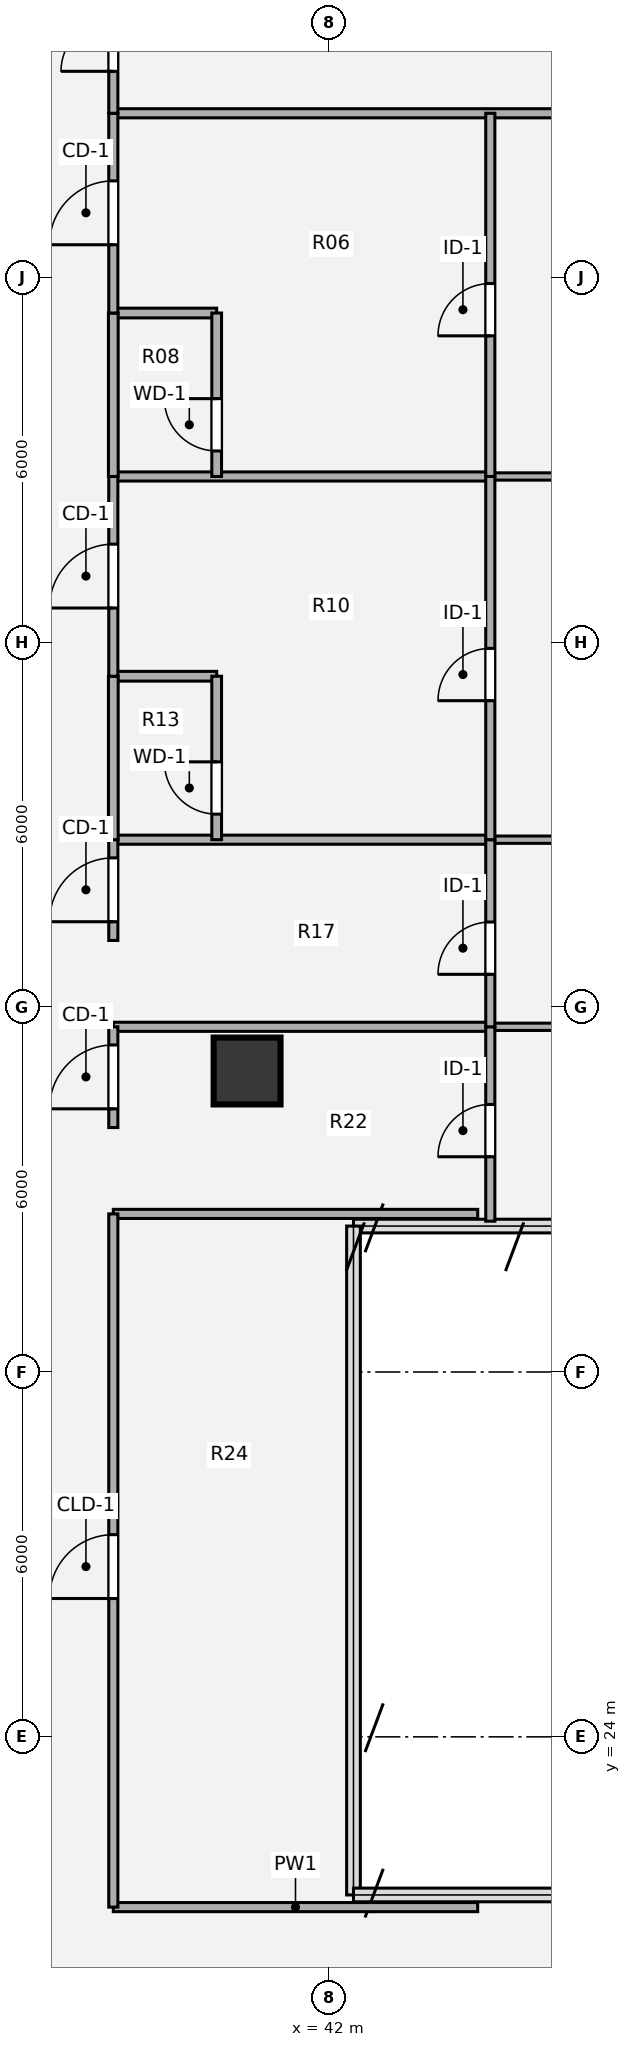
"""IFC4 building model, lengths in metres.
Left out: names, types, materials, properties, quantities, classifications, styles, units other than length and angle.
Written with IfcOpenShell. Run it as: python <this file> out.ifc"""

import sys

from ifc_helpers import new_model, si_unit, direction, frame, frame_2d, origin, origin_2d, place, context, subcontext, project, spatial, rectangle, hollow_circle, extrude, source, transform, mapped, element, fill, save


model = new_model("IFC4")
c1 = context("Model", 3, precision=1e-05, world=origin(), true_north=direction((0.0, 1.0)))
c2 = subcontext(c1, "Body", "Model", "MODEL_VIEW")
j1 = project(units=[si_unit("LENGTHUNIT", "METRE"), si_unit("PLANEANGLEUNIT", "RADIAN")], contexts=[c1])
p1 = place(None, origin())
s1 = spatial("IfcSite", under=j1, at=p1, CompositionType="ELEMENT")
p2 = place(p1, origin())
s2 = spatial("IfcBuilding", under=s1, at=p2, CompositionType="ELEMENT")
p3 = place(p2, frame((0.0, 0.0, 167.76)))
s3 = spatial("IfcBuildingStorey", under=s2, at=p3, CompositionType="ELEMENT", Elevation=167.76)
m1 = source(origin(), c2, "Body", "SweptSolid", [
    extrude(hollow_circle(Radius=0.55, WallThickness=0.04, at=origin_2d()), origin(), (0.0, 0.0, 1.0), 3.78),
])
p4 = place(p3, frame((40.65, 34.95, 0.0), z_axis=(0.0, 0.0, 1.0), x_axis=(1.0, 0.0, 0.0)))
e1 = element("IfcColumn", 1, at=p4, inside=s3, PredefinedType="COLUMN", context=c2, shape_type="MappedRepresentation", body=[
    mapped(m1, transform((0.0, 0.0, 0.0), x_axis=(1.0, 0.0, 0.0), y_axis=(0.0, 1.0, 0.0), z_axis=(0.0, 0.0, 1.0), scale=1.0)),
])
p5 = place(p3, frame((38.45, 21.2, 0.0), z_axis=(0.0, 0.0, 1.0), x_axis=(1.0, 0.0, 0.0)))
e2 = element("IfcWall", 2, at=p5, inside=s3, PredefinedType="PARTITIONING", context=c2, shape_type="SweptSolid", body=[
    extrude(rectangle(XDim=5.993, YDim=0.15, at=frame_2d((2.996, 0.0))), origin(), (0.0, 0.0, 1.0), 3.5),
])
p6 = place(p3, frame((38.45, 32.6, 0.0), z_axis=(0.0, 0.0, 1.0), x_axis=(1.0, 0.0, 0.0)))
e3 = element("IfcWall", 3, at=p6, inside=s3, PredefinedType="PARTITIONING", context=c2, shape_type="SweptSolid", body=[
    extrude(rectangle(XDim=5.993, YDim=0.15, at=frame_2d((2.997, 0.0))), origin(), (0.0, 0.0, 1.0), 3.5),
])
p7 = place(p3, frame((38.45, 35.677, 0.0), z_axis=(0.0, 0.0, 1.0), x_axis=(1.0, 0.0, 0.0)))
e4 = element("IfcWall", 4, at=p7, inside=s3, PredefinedType="PARTITIONING", context=c2, shape_type="SweptSolid", body=[
    extrude(rectangle(XDim=6.2, YDim=0.15, at=frame_2d((3.1, 0.0))), origin(), (0.0, 0.0, 1.0), 2.982),
])
p8 = place(p3, frame((44.65, 35.677, 0.0), z_axis=(0.0, 0.0, 1.0), x_axis=(1.0, 0.0, 0.0)))
e5 = element("IfcWall", 5, at=p8, inside=s3, PredefinedType="PARTITIONING", context=c2, shape_type="SweptSolid", body=[
    extrude(rectangle(XDim=11.47, YDim=0.12, at=frame_2d((5.735, 0.0))), origin(), (0.0, 0.0, 1.0), 2.982),
])
p9 = place(p3, frame((38.45, 38.754, 0.0), z_axis=(0.0, 0.0, 1.0), x_axis=(1.0, 0.0, 0.0)))
e6 = element("IfcWall", 6, at=p9, inside=s3, PredefinedType="PARTITIONING", context=c2, shape_type="SweptSolid", body=[
    extrude(rectangle(XDim=6.2, YDim=0.15, at=frame_2d((3.1, 0.0))), origin(), (0.0, 0.0, 1.0), 2.982),
])
p10 = place(p3, frame((44.65, 38.754, 0.0), z_axis=(0.0, 0.0, 1.0), x_axis=(1.0, 0.0, 0.0)))
e7 = element("IfcWall", 7, at=p10, inside=s3, PredefinedType="PARTITIONING", context=c2, shape_type="SweptSolid", body=[
    extrude(rectangle(XDim=11.47, YDim=0.12, at=frame_2d((5.735, 0.0))), origin(), (0.0, 0.0, 1.0), 2.982),
])
p11 = place(p3, frame((38.45, 41.442, 0.0), z_axis=(0.0, 0.0, 1.0), x_axis=(1.0, 0.0, 0.0)))
e8 = element("IfcWall", 8, at=p11, inside=s3, PredefinedType="PLUMBINGWALL", context=c2, shape_type="SweptSolid", body=[
    extrude(rectangle(XDim=1.7, YDim=0.16, at=frame_2d((0.85, 0.0))), origin(), (0.0, 0.0, 1.0), 3.259),
])
p12 = place(p3, frame((38.45, 44.727, 0.0), z_axis=(0.0, 0.0, 1.0), x_axis=(1.0, 0.0, 0.0)))
e9 = element("IfcWall", 9, at=p12, inside=s3, PredefinedType="PARTITIONING", context=c2, shape_type="SweptSolid", body=[
    extrude(rectangle(XDim=6.2, YDim=0.15, at=frame_2d((3.1, 0.0))), origin(), (0.0, 0.0, 1.0), 3.055),
])
p13 = place(p3, frame((44.65, 44.727, 0.0), z_axis=(0.0, 0.0, 1.0), x_axis=(1.0, 0.0, 0.0)))
e10 = element("IfcWall", 10, at=p13, inside=s3, PredefinedType="PARTITIONING", context=c2, shape_type="SweptSolid", body=[
    extrude(rectangle(XDim=11.47, YDim=0.12, at=frame_2d((5.735, 0.0))), origin(), (0.0, 0.0, 1.0), 3.055),
])
p14 = place(p3, frame((38.45, 47.415, 0.0), z_axis=(0.0, 0.0, 1.0), x_axis=(1.0, 0.0, 0.0)))
e11 = element("IfcWall", 11, at=p14, inside=s3, PredefinedType="PLUMBINGWALL", context=c2, shape_type="SweptSolid", body=[
    extrude(rectangle(XDim=1.7, YDim=0.16, at=frame_2d((0.85, 0.0))), origin(), (0.0, 0.0, 1.0), 3.259),
])
p15 = place(p3, frame((38.45, 50.7, 0.0), z_axis=(0.0, 0.0, 1.0), x_axis=(1.0, 0.0, 0.0)))
e12 = element("IfcWall", 12, at=p15, inside=s3, PredefinedType="PARTITIONING", context=c2, shape_type="SweptSolid", body=[
    extrude(rectangle(XDim=17.569, YDim=0.15, at=frame_2d((8.785, 0.0))), origin(), (0.0, 0.0, 1.0), 3.308),
])
p16 = place(p3, frame((38.45, 21.2, 0.0), z_axis=(0.0, 0.0, 1.0), x_axis=(0.0, 1.0, 0.0)))
e13 = element("IfcWall", 13, at=p16, inside=s3, PredefinedType="PARTITIONING", context=c2, shape_type="SweptSolid", body=[
    extrude(rectangle(XDim=11.4, YDim=0.15, at=frame_2d((5.7, 0.0))), origin(), (0.0, 0.0, 1.0), 3.5),
])
p17 = place(p16, frame((5.075, 0.0, 0.0)))
e14 = element("IfcOpeningElement", 14, at=p17, cuts=e13, PredefinedType="OPENING", context=c2, shape_type="SweptSolid", body=[
    extrude(rectangle(XDim=1.05, YDim=2.1, at=origin_2d()), frame((0.525, 0.085, 1.05), z_axis=(0.0, -1.0, 0.0), x_axis=(1.0, 0.0, 0.0)), (0.0, 0.0, 1.0), 0.17),
])
p18 = place(p3, frame((38.45, 34.02, 0.0), z_axis=(0.0, 0.0, 1.0), x_axis=(0.0, 1.0, 0.0)))
e15 = element("IfcWall", 15, at=p18, inside=s3, PredefinedType="PARTITIONING", context=c2, shape_type="SweptSolid", body=[
    extrude(rectangle(XDim=1.657, YDim=0.15, at=frame_2d((0.829, 0.0))), origin(), (0.0, 0.0, 1.0), 3.5),
])
p19 = place(p18, frame((0.308, 0.0, 0.0)))
e16 = element("IfcOpeningElement", 16, at=p19, cuts=e15, PredefinedType="OPENING", context=c2, shape_type="SweptSolid", body=[
    extrude(rectangle(XDim=1.05, YDim=2.1, at=origin_2d()), frame((0.525, 0.085, 1.05), z_axis=(0.0, -1.0, 0.0), x_axis=(1.0, 0.0, 0.0)), (0.0, 0.0, 1.0), 0.17),
])
p20 = place(p3, frame((38.45, 37.097, 0.0), z_axis=(0.0, 0.0, 1.0), x_axis=(0.0, 1.0, 0.0)))
e17 = element("IfcWall", 17, at=p20, inside=s3, PredefinedType="PARTITIONING", context=c2, shape_type="SweptSolid", body=[
    extrude(rectangle(XDim=1.657, YDim=0.15, at=frame_2d((0.829, 0.0))), origin(), (0.0, 0.0, 1.0), 3.5),
])
p21 = place(p20, frame((0.308, 0.0, 0.0)))
e18 = element("IfcOpeningElement", 18, at=p21, cuts=e17, PredefinedType="OPENING", context=c2, shape_type="SweptSolid", body=[
    extrude(rectangle(XDim=1.05, YDim=2.1, at=origin_2d()), frame((0.525, 0.085, 1.05), z_axis=(0.0, -1.0, 0.0), x_axis=(1.0, 0.0, 0.0)), (0.0, 0.0, 1.0), 0.17),
])
p22 = place(p3, frame((38.45, 38.754, 0.0), z_axis=(0.0, 0.0, 1.0), x_axis=(0.0, 1.0, 0.0)))
e19 = element("IfcWall", 19, at=p22, inside=s3, PredefinedType="PLUMBINGWALL", context=c2, shape_type="SweptSolid", body=[
    extrude(rectangle(XDim=2.688, YDim=0.16, at=frame_2d((1.344, 0.0))), origin(), (0.0, 0.0, 1.0), 3.5),
])
p23 = place(p3, frame((38.45, 41.442, 0.0), z_axis=(0.0, 0.0, 1.0), x_axis=(0.0, 1.0, 0.0)))
e20 = element("IfcWall", 20, at=p23, inside=s3, PredefinedType="PARTITIONING", context=c2, shape_type="SweptSolid", body=[
    extrude(rectangle(XDim=3.285, YDim=0.15, at=frame_2d((1.643, 0.0))), origin(), (0.0, 0.0, 1.0), 3.5),
])
p24 = place(p23, frame((1.122, 0.0, 0.0)))
e21 = element("IfcOpeningElement", 21, at=p24, cuts=e20, PredefinedType="OPENING", context=c2, shape_type="SweptSolid", body=[
    extrude(rectangle(XDim=1.05, YDim=2.1, at=origin_2d()), frame((0.525, 0.085, 1.05), z_axis=(0.0, -1.0, 0.0), x_axis=(1.0, 0.0, 0.0)), (0.0, 0.0, 1.0), 0.17),
])
p25 = place(p3, frame((38.45, 44.727, 0.0), z_axis=(0.0, 0.0, 1.0), x_axis=(0.0, 1.0, 0.0)))
e22 = element("IfcWall", 22, at=p25, inside=s3, PredefinedType="PLUMBINGWALL", context=c2, shape_type="SweptSolid", body=[
    extrude(rectangle(XDim=2.688, YDim=0.16, at=frame_2d((1.344, 0.0))), origin(), (0.0, 0.0, 1.0), 3.5),
])
p26 = place(p3, frame((38.45, 47.415, 0.0), z_axis=(0.0, 0.0, 1.0), x_axis=(0.0, 1.0, 0.0)))
e23 = element("IfcWall", 23, at=p26, inside=s3, PredefinedType="PARTITIONING", context=c2, shape_type="SweptSolid", body=[
    extrude(rectangle(XDim=3.285, YDim=0.15, at=frame_2d((1.643, 0.0))), origin(), (0.0, 0.0, 1.0), 3.5),
])
p27 = place(p26, frame((1.123, 0.0, 0.0)))
e24 = element("IfcOpeningElement", 24, at=p27, cuts=e23, PredefinedType="OPENING", context=c2, shape_type="SweptSolid", body=[
    extrude(rectangle(XDim=1.05, YDim=2.1, at=origin_2d()), frame((0.525, 0.085, 1.05), z_axis=(0.0, -1.0, 0.0), x_axis=(1.0, 0.0, 0.0)), (0.0, 0.0, 1.0), 0.17),
])
p28 = place(p3, frame((38.45, 50.7, 0.0), z_axis=(0.0, 0.0, 1.0), x_axis=(0.0, 1.0, 0.0)))
e25 = element("IfcWall", 25, at=p28, inside=s3, PredefinedType="PARTITIONING", context=c2, shape_type="SweptSolid", body=[
    extrude(rectangle(XDim=2.3, YDim=0.15, at=frame_2d((1.15, 0.0))), origin(), (0.0, 0.0, 1.0), 3.5),
])
p29 = place(p28, frame((0.69, 0.0, 0.0)))
e26 = element("IfcOpeningElement", 26, at=p29, cuts=e25, PredefinedType="OPENING", context=c2, shape_type="SweptSolid", body=[
    extrude(rectangle(XDim=0.86, YDim=2.1, at=origin_2d()), frame((0.43, 0.085, 1.05), z_axis=(0.0, -1.0, 0.0), x_axis=(1.0, 0.0, 0.0)), (0.0, 0.0, 1.0), 0.17),
])
p30 = place(p3, frame((40.15, 38.754, 0.0), z_axis=(0.0, 0.0, 1.0), x_axis=(0.0, 1.0, 0.0)))
e27 = element("IfcWall", 27, at=p30, inside=s3, PredefinedType="PLUMBINGWALL", context=c2, shape_type="SweptSolid", body=[
    extrude(rectangle(XDim=2.688, YDim=0.16, at=frame_2d((1.344, 0.0))), origin(), (0.0, 0.0, 1.0), 3.5),
])
p31 = place(p30, frame((0.42, 0.0, 0.0)))
e28 = element("IfcOpeningElement", 28, at=p31, cuts=e27, PredefinedType="OPENING", context=c2, shape_type="SweptSolid", body=[
    extrude(rectangle(XDim=0.86, YDim=2.1, at=origin_2d()), frame((0.43, 0.09, 1.05), z_axis=(0.0, -1.0, 0.0), x_axis=(1.0, 0.0, 0.0)), (0.0, 0.0, 1.0), 0.18),
])
p32 = place(p3, frame((40.15, 44.727, 0.0), z_axis=(0.0, 0.0, 1.0), x_axis=(0.0, 1.0, 0.0)))
e29 = element("IfcWall", 29, at=p32, inside=s3, PredefinedType="PLUMBINGWALL", context=c2, shape_type="SweptSolid", body=[
    extrude(rectangle(XDim=2.688, YDim=0.16, at=frame_2d((1.344, 0.0))), origin(), (0.0, 0.0, 1.0), 3.5),
])
p33 = place(p32, frame((0.42, 0.0, 0.0)))
e30 = element("IfcOpeningElement", 30, at=p33, cuts=e29, PredefinedType="OPENING", context=c2, shape_type="SweptSolid", body=[
    extrude(rectangle(XDim=0.86, YDim=2.1, at=origin_2d()), frame((0.43, 0.09, 1.05), z_axis=(0.0, -1.0, 0.0), x_axis=(1.0, 0.0, 0.0)), (0.0, 0.0, 1.0), 0.18),
])
p34 = place(p3, frame((44.65, 32.48, 0.0), z_axis=(0.0, 0.0, 1.0), x_axis=(0.0, 1.0, 0.0)))
e31 = element("IfcWall", 31, at=p34, inside=s3, PredefinedType="PARTITIONING", context=c2, shape_type="SweptSolid", body=[
    extrude(rectangle(XDim=3.197, YDim=0.15, at=frame_2d((1.599, 0.0))), origin(), (0.0, 0.0, 1.0), 3.5),
])
p35 = place(p34, frame((1.06, 0.0, 0.0)))
e32 = element("IfcOpeningElement", 32, at=p35, cuts=e31, PredefinedType="OPENING", context=c2, shape_type="SweptSolid", body=[
    extrude(rectangle(XDim=0.86, YDim=2.1, at=origin_2d()), frame((0.43, 0.085, 1.05), z_axis=(0.0, -1.0, 0.0), x_axis=(1.0, 0.0, 0.0)), (0.0, 0.0, 1.0), 0.17),
])
p36 = place(p3, frame((44.65, 35.677, 0.0), z_axis=(0.0, 0.0, 1.0), x_axis=(0.0, 1.0, 0.0)))
e33 = element("IfcWall", 33, at=p36, inside=s3, PredefinedType="PARTITIONING", context=c2, shape_type="SweptSolid", body=[
    extrude(rectangle(XDim=3.077, YDim=0.15, at=frame_2d((1.539, 0.0))), origin(), (0.0, 0.0, 1.0), 3.5),
])
p37 = place(p36, frame((0.863, 0.0, 0.0)))
e34 = element("IfcOpeningElement", 34, at=p37, cuts=e33, PredefinedType="OPENING", context=c2, shape_type="SweptSolid", body=[
    extrude(rectangle(XDim=0.86, YDim=2.1, at=origin_2d()), frame((0.43, 0.085, 1.05), z_axis=(0.0, -1.0, 0.0), x_axis=(1.0, 0.0, 0.0)), (0.0, 0.0, 1.0), 0.17),
])
p38 = place(p3, frame((44.65, 38.754, 0.0), z_axis=(0.0, 0.0, 1.0), x_axis=(0.0, 1.0, 0.0)))
e35 = element("IfcWall", 35, at=p38, inside=s3, PredefinedType="PARTITIONING", context=c2, shape_type="SweptSolid", body=[
    extrude(rectangle(XDim=5.973, YDim=0.15, at=frame_2d((2.987, 0.0))), origin(), (0.0, 0.0, 1.0), 3.5),
])
p39 = place(p38, frame((2.286, 0.0, 0.0)))
e36 = element("IfcOpeningElement", 36, at=p39, cuts=e35, PredefinedType="OPENING", context=c2, shape_type="SweptSolid", body=[
    extrude(rectangle(XDim=0.86, YDim=2.1, at=origin_2d()), frame((0.43, 0.085, 1.05), z_axis=(0.0, -1.0, 0.0), x_axis=(1.0, 0.0, 0.0)), (0.0, 0.0, 1.0), 0.17),
])
p40 = place(p3, frame((44.65, 44.727, 0.0), z_axis=(0.0, 0.0, 1.0), x_axis=(0.0, 1.0, 0.0)))
e37 = element("IfcWall", 37, at=p40, inside=s3, PredefinedType="PARTITIONING", context=c2, shape_type="SweptSolid", body=[
    extrude(rectangle(XDim=5.973, YDim=0.15, at=frame_2d((2.986, 0.0))), origin(), (0.0, 0.0, 1.0), 3.5),
])
p41 = place(p40, frame((2.313, 0.0, 0.0)))
e38 = element("IfcOpeningElement", 38, at=p41, cuts=e37, PredefinedType="OPENING", context=c2, shape_type="SweptSolid", body=[
    extrude(rectangle(XDim=0.86, YDim=2.1, at=origin_2d()), frame((0.43, 0.085, 1.05), z_axis=(0.0, -1.0, 0.0), x_axis=(1.0, 0.0, 0.0)), (0.0, 0.0, 1.0), 0.17),
])
m2 = source(origin(), c2, "Body", "SweptSolid", [
    extrude(rectangle(XDim=1.05, YDim=2.1, at=origin_2d()), frame((0.525, 0.025, 1.05), z_axis=(0.0, -1.0, 0.0), x_axis=(1.0, 0.0, 0.0)), (0.0, 0.0, 1.0), 0.05),
])
p42 = place(p17, origin())
e39 = element("IfcDoor", 39, at=p42, inside=s3, OperationType="SINGLE_SWING_LEFT", PredefinedType="DOOR", context=c2, shape_type="MappedRepresentation", body=[
    mapped(m2, transform((0.0, 0.0, 0.0), x_axis=(1.0, 0.0, 0.0), y_axis=(0.0, 1.0, 0.0), z_axis=(0.0, 0.0, 1.0), scale=1.0)),
])
fill(e14, e39)
m3 = source(origin(), c2, "Body", "SweptSolid", [
    extrude(rectangle(XDim=1.05, YDim=2.1, at=origin_2d()), frame((0.525, 0.025, 1.05), z_axis=(0.0, -1.0, 0.0), x_axis=(1.0, 0.0, 0.0)), (0.0, 0.0, 1.0), 0.05),
])
p43 = place(p19, origin())
e40 = element("IfcDoor", 40, at=p43, inside=s3, OperationType="SINGLE_SWING_LEFT", PredefinedType="DOOR", context=c2, shape_type="MappedRepresentation", body=[
    mapped(m3, transform((0.0, 0.0, 0.0), x_axis=(1.0, 0.0, 0.0), y_axis=(0.0, 1.0, 0.0), z_axis=(0.0, 0.0, 1.0), scale=1.0)),
])
fill(e16, e40)
p44 = place(p21, origin())
e41 = element("IfcDoor", 41, at=p44, inside=s3, OperationType="SINGLE_SWING_LEFT", PredefinedType="DOOR", context=c2, shape_type="MappedRepresentation", body=[
    mapped(m3, transform((0.0, 0.0, 0.0), x_axis=(1.0, 0.0, 0.0), y_axis=(0.0, 1.0, 0.0), z_axis=(0.0, 0.0, 1.0), scale=1.0)),
])
fill(e18, e41)
p45 = place(p24, origin())
e42 = element("IfcDoor", 42, at=p45, inside=s3, OperationType="SINGLE_SWING_LEFT", PredefinedType="DOOR", context=c2, shape_type="MappedRepresentation", body=[
    mapped(m3, transform((0.0, 0.0, 0.0), x_axis=(1.0, 0.0, 0.0), y_axis=(0.0, 1.0, 0.0), z_axis=(0.0, 0.0, 1.0), scale=1.0)),
])
fill(e21, e42)
p46 = place(p27, origin())
e43 = element("IfcDoor", 43, at=p46, inside=s3, OperationType="SINGLE_SWING_LEFT", PredefinedType="DOOR", context=c2, shape_type="MappedRepresentation", body=[
    mapped(m3, transform((0.0, 0.0, 0.0), x_axis=(1.0, 0.0, 0.0), y_axis=(0.0, 1.0, 0.0), z_axis=(0.0, 0.0, 1.0), scale=1.0)),
])
fill(e24, e43)
m4 = source(origin(), c2, "Body", "SweptSolid", [
    extrude(rectangle(XDim=0.86, YDim=2.1, at=origin_2d()), frame((0.43, 0.025, 1.05), z_axis=(0.0, -1.0, 0.0), x_axis=(1.0, 0.0, 0.0)), (0.0, 0.0, 1.0), 0.05),
])
p47 = place(p29, origin())
e44 = element("IfcDoor", 44, at=p47, inside=s3, OperationType="SINGLE_SWING_LEFT", PredefinedType="DOOR", context=c2, shape_type="MappedRepresentation", body=[
    mapped(m4, transform((0.0, 0.0, 0.0), x_axis=(1.0, 0.0, 0.0), y_axis=(0.0, 1.0, 0.0), z_axis=(0.0, 0.0, 1.0), scale=1.0)),
])
fill(e26, e44)
m5 = source(origin(), c2, "Body", "SweptSolid", [
    extrude(rectangle(XDim=0.86, YDim=2.1, at=origin_2d()), frame((0.43, 0.025, 1.05), z_axis=(0.0, -1.0, 0.0), x_axis=(1.0, 0.0, 0.0)), (0.0, 0.0, 1.0), 0.05),
])
p48 = place(p31, origin())
e45 = element("IfcDoor", 45, at=p48, inside=s3, OperationType="SINGLE_SWING_RIGHT", PredefinedType="DOOR", context=c2, shape_type="MappedRepresentation", body=[
    mapped(m5, transform((0.0, 0.0, 0.0), x_axis=(1.0, 0.0, 0.0), y_axis=(0.0, 1.0, 0.0), z_axis=(0.0, 0.0, 1.0), scale=1.0)),
])
fill(e28, e45)
p49 = place(p33, origin())
e46 = element("IfcDoor", 46, at=p49, inside=s3, OperationType="SINGLE_SWING_RIGHT", PredefinedType="DOOR", context=c2, shape_type="MappedRepresentation", body=[
    mapped(m5, transform((0.0, 0.0, 0.0), x_axis=(1.0, 0.0, 0.0), y_axis=(0.0, 1.0, 0.0), z_axis=(0.0, 0.0, 1.0), scale=1.0)),
])
fill(e30, e46)
p50 = place(p35, origin())
e47 = element("IfcDoor", 47, at=p50, inside=s3, OperationType="SINGLE_SWING_LEFT", PredefinedType="DOOR", context=c2, shape_type="MappedRepresentation", body=[
    mapped(m4, transform((0.0, 0.0, 0.0), x_axis=(1.0, 0.0, 0.0), y_axis=(0.0, 1.0, 0.0), z_axis=(0.0, 0.0, 1.0), scale=1.0)),
])
fill(e32, e47)
p51 = place(p37, origin())
e48 = element("IfcDoor", 48, at=p51, inside=s3, OperationType="SINGLE_SWING_LEFT", PredefinedType="DOOR", context=c2, shape_type="MappedRepresentation", body=[
    mapped(m4, transform((0.0, 0.0, 0.0), x_axis=(1.0, 0.0, 0.0), y_axis=(0.0, 1.0, 0.0), z_axis=(0.0, 0.0, 1.0), scale=1.0)),
])
fill(e34, e48)
p52 = place(p39, origin())
e49 = element("IfcDoor", 49, at=p52, inside=s3, OperationType="SINGLE_SWING_LEFT", PredefinedType="DOOR", context=c2, shape_type="MappedRepresentation", body=[
    mapped(m4, transform((0.0, 0.0, 0.0), x_axis=(1.0, 0.0, 0.0), y_axis=(0.0, 1.0, 0.0), z_axis=(0.0, 0.0, 1.0), scale=1.0)),
])
fill(e36, e49)
p53 = place(p41, origin())
e50 = element("IfcDoor", 50, at=p53, inside=s3, OperationType="SINGLE_SWING_LEFT", PredefinedType="DOOR", context=c2, shape_type="MappedRepresentation", body=[
    mapped(m4, transform((0.0, 0.0, 0.0), x_axis=(1.0, 0.0, 0.0), y_axis=(0.0, 1.0, 0.0), z_axis=(0.0, 0.0, 1.0), scale=1.0)),
])
fill(e38, e50)
save(model, sys.argv[1])
